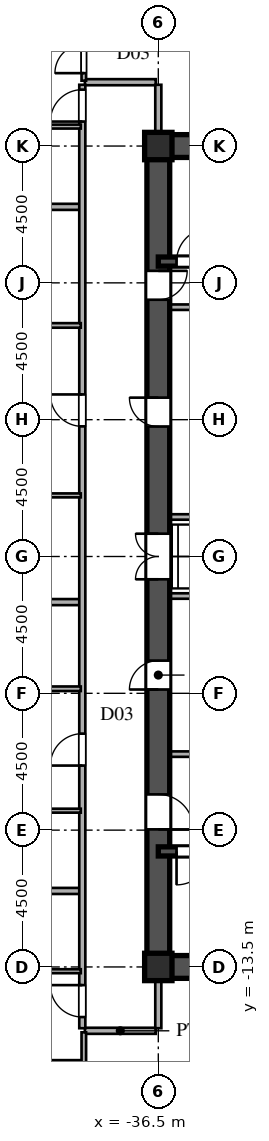
"""IFC4 building model, lengths in metres.
Left out: names, types, materials, properties, quantities, classifications, styles, units other than length and angle.
Written with IfcOpenShell. Run it as: python <this file> out.ifc"""

import sys

from ifc_helpers import new_model, si_unit, direction, frame, frame_2d, origin, origin_2d, place, context, subcontext, project, spatial, rectangle, i_section, extrude, source, transform, mapped, element, fill, save


model = new_model("IFC4")
c1 = context("Model", 3, precision=1e-05, world=origin(), true_north=direction((0.0, 1.0)))
c2 = subcontext(c1, "Body", "Model", "MODEL_VIEW")
j1 = project(units=[si_unit("LENGTHUNIT", "METRE"), si_unit("PLANEANGLEUNIT", "RADIAN")], contexts=[c1])
p1 = place(None, origin())
s1 = spatial("IfcSite", under=j1, at=p1, CompositionType="ELEMENT")
p2 = place(p1, origin())
s2 = spatial("IfcBuilding", under=s1, at=p2, CompositionType="ELEMENT")
p3 = place(p2, frame((0.0, 0.0, 40.5)))
s3 = spatial("IfcBuildingStorey", under=s2, at=p3, CompositionType="ELEMENT", Elevation=40.5)
m1 = source(origin(), c2, "Body", "SweptSolid", [
    extrude(i_section(OverallWidth=0.9, OverallDepth=0.9, WebThickness=0.036, FlangeThickness=0.055, at=origin_2d()), origin(), (0.0, 0.0, 1.0), 3.6),
])
for number, where, z_axis, x_axis in (
    (1, (-36.5, -13.5, 0.0), (0.0, 0.0, 1.0), (1.0, 0.0, 0.0)),
    (2, (-36.5, 13.5, 0.0), (0.0, 0.0, 1.0), (1.0, 0.0, 0.0)),
):
    element("IfcColumn", number, at=place(p3, frame(where, z_axis=z_axis, x_axis=x_axis)), inside=s3, PredefinedType="COLUMN", context=c2, shape_type="MappedRepresentation", body=[
        mapped(m1, transform((0.0, 0.0, 0.0), scale=1.0)),
    ])
for number, where, z_axis, x_axis in (
    (3, (-36.5, -13.5, 0.0), (0.0, 0.0, 1.0), (1.0, 0.0, 0.0)),
    (4, (-36.5, 13.5, 0.0), (0.0, 0.0, 1.0), (1.0, 0.0, 0.0)),
):
    element("IfcWall", number, at=place(p3, frame(where, z_axis=z_axis, x_axis=x_axis)), inside=s3, PredefinedType="SHEAR", context=c2, shape_type="SweptSolid", body=[
        extrude(rectangle(XDim=9.0, YDim=0.75, at=frame_2d((4.5, 0.0))), origin(), (0.0, 0.0, 1.0), 3.38),
    ])
p4 = place(p3, frame((-36.5, -13.65, 0.0), z_axis=(0.0, 0.0, 1.0), x_axis=(0.0, 1.0, 0.0)))
e5 = element("IfcWall", 5, at=p4, inside=s3, PredefinedType="SHEAR", context=c2, shape_type="SweptSolid", body=[
    extrude(rectangle(XDim=7.15, YDim=0.75, at=frame_2d((3.575, 0.0))), origin(), (0.0, 0.0, 1.0), 3.38),
])
p5 = place(p4, frame((4.675, 0.0, 0.0)))
e6 = element("IfcOpeningElement", 6, at=p5, cuts=e5, PredefinedType="OPENING", context=c2, shape_type="SweptSolid", body=[
    extrude(rectangle(XDim=1.15, YDim=2.2, at=frame_2d((0.575, 1.1))), frame((0.0, 0.385, 0.0), z_axis=(0.0, -1.0, 0.0), x_axis=(1.0, 0.0, 0.0)), (0.0, 0.0, 1.0), 0.77),
])
p6 = place(p3, frame((-36.5, -1.3, 0.0), z_axis=(0.0, 0.0, 1.0), x_axis=(0.0, 1.0, 0.0)))
e7 = element("IfcWall", 7, at=p6, inside=s3, PredefinedType="SHEAR", context=c2, shape_type="SweptSolid", body=[
    extrude(rectangle(XDim=2.6, YDim=0.75, at=frame_2d((1.3, 0.0))), origin(), (0.0, 0.0, 1.0), 3.38),
])
p7 = place(p6, frame((0.55, 0.0, 0.0)))
e8 = element("IfcOpeningElement", 8, at=p7, cuts=e7, PredefinedType="OPENING", context=c2, shape_type="SweptSolid", body=[
    extrude(rectangle(XDim=1.5, YDim=2.3, at=frame_2d((0.75, 1.15))), frame((0.0, 0.385, 0.0), z_axis=(0.0, -1.0, 0.0), x_axis=(1.0, 0.0, 0.0)), (0.0, 0.0, 1.0), 0.77),
])
p8 = place(p3, frame((-36.5, 8.2, 0.0), z_axis=(0.0, 0.0, 1.0), x_axis=(0.0, 1.0, 0.0)))
e9 = element("IfcWall", 9, at=p8, inside=s3, PredefinedType="SHEAR", context=c2, shape_type="SweptSolid", body=[
    extrude(rectangle(XDim=5.45, YDim=0.75, at=frame_2d((2.725, 0.0))), origin(), (0.0, 0.0, 1.0), 3.38),
])
p9 = place(p8, frame((0.245, 0.0, 0.0)))
e10 = element("IfcOpeningElement", 10, at=p9, cuts=e9, PredefinedType="OPENING", context=c2, shape_type="SweptSolid", body=[
    extrude(rectangle(XDim=0.95, YDim=2.15, at=frame_2d((0.475, 1.075))), frame((0.0, 0.385, 0.0), z_axis=(0.0, -1.0, 0.0), x_axis=(1.0, 0.0, 0.0)), (0.0, 0.0, 1.0), 0.77),
])
p10 = place(p3, frame((-36.5, -6.5, 0.0), z_axis=(0.0, 0.0, 1.0), x_axis=(0.0, 1.0, 0.0)))
e11 = element("IfcWall", 11, at=p10, inside=s3, PredefinedType="SHEAR", context=c2, shape_type="SweptSolid", body=[
    extrude(rectangle(XDim=5.2, YDim=0.75, at=frame_2d((2.6, 0.0))), origin(), (0.0, 0.0, 1.0), 3.38),
])
p11 = place(p10, frame((2.125, 0.0, 0.0)))
e12 = element("IfcOpeningElement", 12, at=p11, cuts=e11, PredefinedType="OPENING", context=c2, shape_type="SweptSolid", body=[
    extrude(rectangle(XDim=0.95, YDim=2.15, at=frame_2d((0.475, 1.075))), frame((0.0, 0.385, 0.0), z_axis=(0.0, -1.0, 0.0), x_axis=(1.0, 0.0, 0.0)), (0.0, 0.0, 1.0), 0.77),
])
p12 = place(p3, frame((-36.5, 1.3, 0.0), z_axis=(0.0, 0.0, 1.0), x_axis=(0.0, 1.0, 0.0)))
e13 = element("IfcWall", 13, at=p12, inside=s3, PredefinedType="SHEAR", context=c2, shape_type="SweptSolid", body=[
    extrude(rectangle(XDim=6.9, YDim=0.75, at=frame_2d((3.45, 0.0))), origin(), (0.0, 0.0, 1.0), 3.38),
])
p13 = place(p12, frame((2.975, 0.0, 0.0)))
e14 = element("IfcOpeningElement", 14, at=p13, cuts=e13, PredefinedType="OPENING", context=c2, shape_type="SweptSolid", body=[
    extrude(rectangle(XDim=0.95, YDim=2.15, at=frame_2d((0.475, 1.075))), frame((0.0, 0.385, 0.0), z_axis=(0.0, -1.0, 0.0), x_axis=(1.0, 0.0, 0.0)), (0.0, 0.0, 1.0), 0.77),
])
p14 = place(p3, frame((-36.5, -9.7, 0.0), z_axis=(0.0, 0.0, 1.0), x_axis=(1.0, 0.0, 0.0)))
e15 = element("IfcWall", 15, at=p14, inside=s3, PredefinedType="SHEAR", context=c2, shape_type="SweptSolid", body=[
    extrude(rectangle(XDim=9.0, YDim=0.3, at=frame_2d((4.5, 0.0))), origin(), (0.0, 0.0, 1.0), 3.38),
])
p15 = place(p14, frame((0.6, 0.0, 0.0)))
e16 = element("IfcOpeningElement", 16, at=p15, cuts=e15, PredefinedType="OPENING", context=c2, shape_type="SweptSolid", body=[
    extrude(rectangle(XDim=1.1, YDim=2.2, at=frame_2d((0.55, 1.1))), frame((0.0, 0.16, 0.0), z_axis=(0.0, -1.0, 0.0), x_axis=(1.0, 0.0, 0.0)), (0.0, 0.0, 1.0), 0.32),
])
p16 = place(p3, frame((-36.5, 9.7, 0.0), z_axis=(0.0, 0.0, 1.0), x_axis=(1.0, 0.0, 0.0)))
e17 = element("IfcWall", 17, at=p16, inside=s3, PredefinedType="SHEAR", context=c2, shape_type="SweptSolid", body=[
    extrude(rectangle(XDim=9.0, YDim=0.3, at=frame_2d((4.5, 0.0))), origin(), (0.0, 0.0, 1.0), 3.38),
])
p17 = place(p16, frame((0.6, 0.0, 0.0)))
e18 = element("IfcOpeningElement", 18, at=p17, cuts=e17, PredefinedType="OPENING", context=c2, shape_type="SweptSolid", body=[
    extrude(rectangle(XDim=1.1, YDim=2.2, at=frame_2d((0.55, 1.1))), frame((0.0, 0.16, 0.0), z_axis=(0.0, -1.0, 0.0), x_axis=(1.0, 0.0, 0.0)), (0.0, 0.0, 1.0), 0.32),
])
for number, where, z_axis, x_axis in (
    (19, (-36.15, -6.5, 0.0), (0.0, 0.0, 1.0), (1.0, 0.0, 0.0)),
    (20, (-36.15, 8.2, 0.0), (0.0, 0.0, 1.0), (1.0, 0.0, 0.0)),
):
    element("IfcWall", number, at=place(p3, frame(where, z_axis=z_axis, x_axis=x_axis)), inside=s3, PredefinedType="PARTITIONING", context=c2, shape_type="SweptSolid", body=[
        extrude(rectangle(XDim=5.7, YDim=0.18, at=frame_2d((2.85, 0.0))), origin(), (0.0, 0.0, 1.0), 3.38),
    ])
for number, where, z_axis, x_axis in (
    (21, (-36.15, -1.3, 0.0), (0.0, 0.0, 1.0), (1.0, 0.0, 0.0)),
    (22, (-36.15, 1.3, 0.0), (0.0, 0.0, 1.0), (1.0, 0.0, 0.0)),
):
    element("IfcWall", number, at=place(p3, frame(where, z_axis=z_axis, x_axis=x_axis)), inside=s3, PredefinedType="PARTITIONING", context=c2, shape_type="SweptSolid", body=[
        extrude(rectangle(XDim=2.95, YDim=0.18, at=frame_2d((1.475, 0.0))), origin(), (0.0, 0.0, 1.0), 3.38),
    ])
p18 = place(p3, frame((-44.55, -16.64, 0.0), z_axis=(0.0, 0.0, 1.0), x_axis=(1.0, 0.0, 0.0)))
e23 = element("IfcWall", 23, at=p18, inside=s3, PredefinedType="PARTITIONING", context=c2, shape_type="SweptSolid", body=[
    extrude(rectangle(XDim=5.55, YDim=0.15, at=frame_2d((2.775, 0.0))), origin(), (0.0, 0.0, 1.0), 3.38),
])
p19 = place(p18, frame((2.3, 0.0, 0.0)))
e24 = element("IfcOpeningElement", 24, at=p19, cuts=e23, PredefinedType="OPENING", context=c2, shape_type="SweptSolid", body=[
    extrude(rectangle(XDim=0.95, YDim=2.15, at=frame_2d((0.475, 1.075))), frame((0.0, 0.085, 0.0), z_axis=(0.0, -1.0, 0.0), x_axis=(1.0, 0.0, 0.0)), (0.0, 0.0, 1.0), 0.17),
])
p20 = place(p3, frame((-38.915, -15.6, 0.0), z_axis=(0.0, 0.0, 1.0), x_axis=(1.0, 0.0, 0.0)))
e25 = element("IfcWall", 25, at=p20, inside=s3, PredefinedType="PARTITIONING", context=c2, shape_type="SweptSolid", body=[
    extrude(rectangle(XDim=2.33, YDim=0.2, at=frame_2d((1.165, 0.0))), origin(), (0.0, 0.0, 1.0), 3.38),
])
p21 = place(p3, frame((-44.55, -13.64, 0.0), z_axis=(0.0, 0.0, 1.0), x_axis=(1.0, 0.0, 0.0)))
e26 = element("IfcWall", 26, at=p21, inside=s3, PredefinedType="PARTITIONING", context=c2, shape_type="SweptSolid", body=[
    extrude(rectangle(XDim=5.5, YDim=0.13, at=frame_2d((2.75, 0.0))), origin(), (0.0, 0.0, 1.0), 2.68),
])
p22 = place(p21, frame((2.31, 0.0, 0.0)))
e27 = element("IfcOpeningElement", 27, at=p22, cuts=e26, PredefinedType="OPENING", context=c2, shape_type="SweptSolid", body=[
    extrude(rectangle(XDim=0.88, YDim=2.1, at=frame_2d((0.44, 1.05))), frame((0.0, 0.075, 0.0), z_axis=(0.0, -1.0, 0.0), x_axis=(1.0, 0.0, 0.0)), (0.0, 0.0, 1.0), 0.15),
])
p23 = place(p3, frame((-70.043, -11.0, 0.0), z_axis=(0.0, 0.0, 1.0), x_axis=(1.0, 0.0, 0.0)))
e28 = element("IfcWall", 28, at=p23, inside=s3, PredefinedType="PARTITIONING", context=c2, shape_type="SweptSolid", body=[
    extrude(rectangle(XDim=30.963, YDim=0.2, at=frame_2d((15.481, 0.0))), origin(), (0.0, 0.0, 1.0), 3.38),
])
p24 = place(p3, frame((-44.55, -8.36, 0.0), z_axis=(0.0, 0.0, 1.0), x_axis=(1.0, 0.0, 0.0)))
e29 = element("IfcWall", 29, at=p24, inside=s3, PredefinedType="PARTITIONING", context=c2, shape_type="SweptSolid", body=[
    extrude(rectangle(XDim=5.5, YDim=0.13, at=frame_2d((2.75, 0.0))), origin(), (0.0, 0.0, 1.0), 3.38),
])
p25 = place(p24, frame((2.31, 0.0, 0.0)))
e30 = element("IfcOpeningElement", 30, at=p25, cuts=e29, PredefinedType="OPENING", context=c2, shape_type="SweptSolid", body=[
    extrude(rectangle(XDim=0.88, YDim=2.1, at=frame_2d((0.44, 1.05))), frame((0.0, 0.075, 0.0), z_axis=(0.0, -1.0, 0.0), x_axis=(1.0, 0.0, 0.0)), (0.0, 0.0, 1.0), 0.15),
])
p26 = place(p3, frame((-44.55, -4.35, 0.0), z_axis=(0.0, 0.0, 1.0), x_axis=(1.0, 0.0, 0.0)))
e31 = element("IfcWall", 31, at=p26, inside=s3, PredefinedType="PARTITIONING", context=c2, shape_type="SweptSolid", body=[
    extrude(rectangle(XDim=5.5, YDim=0.15, at=frame_2d((2.75, 0.0))), origin(), (0.0, 0.0, 1.0), 2.68),
])
p27 = place(p26, frame((2.275, 0.0, 0.0)))
e32 = element("IfcOpeningElement", 32, at=p27, cuts=e31, PredefinedType="OPENING", context=c2, shape_type="SweptSolid", body=[
    extrude(rectangle(XDim=0.95, YDim=2.15, at=frame_2d((0.475, 1.075))), frame((0.0, 0.085, 0.0), z_axis=(0.0, -1.0, 0.0), x_axis=(1.0, 0.0, 0.0)), (0.0, 0.0, 1.0), 0.17),
])
p28 = place(p3, frame((-72.505, -1.5, 0.0), z_axis=(0.0, 0.0, 1.0), x_axis=(1.0, 0.0, 0.0)))
e33 = element("IfcWall", 33, at=p28, inside=s3, PredefinedType="PARTITIONING", context=c2, shape_type="SweptSolid", body=[
    extrude(rectangle(XDim=33.425, YDim=0.2, at=frame_2d((16.712, 0.0))), origin(), (0.0, 0.0, 1.0), 3.38),
])
p29 = place(p3, frame((-44.55, 2.01, 0.0), z_axis=(0.0, 0.0, 1.0), x_axis=(1.0, 0.0, 0.0)))
e34 = element("IfcWall", 34, at=p29, inside=s3, PredefinedType="PARTITIONING", context=c2, shape_type="SweptSolid", body=[
    extrude(rectangle(XDim=5.5, YDim=0.13, at=frame_2d((2.75, 0.0))), origin(), (0.0, 0.0, 1.0), 3.38),
])
p30 = place(p29, frame((2.31, 0.0, 0.0)))
e35 = element("IfcOpeningElement", 35, at=p30, cuts=e34, PredefinedType="OPENING", context=c2, shape_type="SweptSolid", body=[
    extrude(rectangle(XDim=0.88, YDim=2.1, at=frame_2d((0.44, 1.05))), frame((0.0, 0.075, 0.0), z_axis=(0.0, -1.0, 0.0), x_axis=(1.0, 0.0, 0.0)), (0.0, 0.0, 1.0), 0.15),
])
p31 = place(p3, frame((-44.55, 7.6, 0.0), z_axis=(0.0, 0.0, 1.0), x_axis=(1.0, 0.0, 0.0)))
e36 = element("IfcWall", 36, at=p31, inside=s3, PredefinedType="PARTITIONING", context=c2, shape_type="SweptSolid", body=[
    extrude(rectangle(XDim=5.5, YDim=0.15, at=frame_2d((2.75, 0.0))), origin(), (0.0, 0.0, 1.0), 3.38),
])
p32 = place(p31, frame((2.275, 0.0, 0.0)))
e37 = element("IfcOpeningElement", 37, at=p32, cuts=e36, PredefinedType="OPENING", context=c2, shape_type="SweptSolid", body=[
    extrude(rectangle(XDim=0.95, YDim=2.15, at=frame_2d((0.475, 1.075))), frame((0.0, 0.085, 0.0), z_axis=(0.0, -1.0, 0.0), x_axis=(1.0, 0.0, 0.0)), (0.0, 0.0, 1.0), 0.17),
])
p33 = place(p3, frame((-68.807, 11.5, 0.0), z_axis=(0.0, 0.0, 1.0), x_axis=(1.0, 0.0, 0.0)))
e38 = element("IfcWall", 38, at=p33, inside=s3, PredefinedType="PARTITIONING", context=c2, shape_type="SweptSolid", body=[
    extrude(rectangle(XDim=29.727, YDim=0.2, at=frame_2d((14.863, 0.0))), origin(), (0.0, 0.0, 1.0), 3.38),
])
p34 = place(p3, frame((-44.55, 14.14, 0.0), z_axis=(0.0, 0.0, 1.0), x_axis=(1.0, 0.0, 0.0)))
e39 = element("IfcWall", 39, at=p34, inside=s3, PredefinedType="PARTITIONING", context=c2, shape_type="SweptSolid", body=[
    extrude(rectangle(XDim=5.5, YDim=0.13, at=frame_2d((2.75, 0.0))), origin(), (0.0, 0.0, 1.0), 3.38),
])
p35 = place(p34, frame((2.31, 0.0, 0.0)))
e40 = element("IfcOpeningElement", 40, at=p35, cuts=e39, PredefinedType="OPENING", context=c2, shape_type="SweptSolid", body=[
    extrude(rectangle(XDim=0.88, YDim=2.1, at=frame_2d((0.44, 1.05))), frame((0.0, 0.075, 0.0), z_axis=(0.0, -1.0, 0.0), x_axis=(1.0, 0.0, 0.0)), (0.0, 0.0, 1.0), 0.15),
])
p36 = place(p3, frame((-38.915, 15.6, 0.0), z_axis=(0.0, 0.0, 1.0), x_axis=(1.0, 0.0, 0.0)))
e41 = element("IfcWall", 41, at=p36, inside=s3, PredefinedType="PARTITIONING", context=c2, shape_type="SweptSolid", body=[
    extrude(rectangle(XDim=2.33, YDim=0.2, at=frame_2d((1.165, 0.0))), origin(), (0.0, 0.0, 1.0), 3.38),
])
p37 = place(p3, frame((-39.0, -15.515, 0.0), z_axis=(0.0, 0.0, 1.0), x_axis=(0.0, 1.0, 0.0)))
e42 = element("IfcWall", 42, at=p37, inside=s3, PredefinedType="PARTITIONING", context=c2, shape_type="SweptSolid", body=[
    extrude(rectangle(XDim=31.03, YDim=0.2, at=frame_2d((15.515, 0.0))), origin(), (0.0, 0.0, 1.0), 3.38),
])
p38 = place(p37, frame((0.367, 0.0, 0.0)))
e43 = element("IfcOpeningElement", 43, at=p38, cuts=e42, PredefinedType="OPENING", context=c2, shape_type="SweptSolid", body=[
    extrude(rectangle(XDim=1.05, YDim=2.25, at=frame_2d((0.525, 1.125))), frame((0.0, 0.11, 0.0), z_axis=(0.0, -1.0, 0.0), x_axis=(1.0, 0.0, 0.0)), (0.0, 0.0, 1.0), 0.22),
])
p39 = place(p37, frame((8.638, 0.0, 0.0)))
e44 = element("IfcOpeningElement", 44, at=p39, cuts=e42, PredefinedType="OPENING", context=c2, shape_type="SweptSolid", body=[
    extrude(rectangle(XDim=1.05, YDim=2.25, at=frame_2d((0.525, 1.125))), frame((0.0, 0.11, 0.0), z_axis=(0.0, -1.0, 0.0), x_axis=(1.0, 0.0, 0.0)), (0.0, 0.0, 1.0), 0.22),
])
p40 = place(p37, frame((19.795, 0.0, 0.0)))
e45 = element("IfcOpeningElement", 45, at=p40, cuts=e42, PredefinedType="OPENING", context=c2, shape_type="SweptSolid", body=[
    extrude(rectangle(XDim=1.05, YDim=2.25, at=frame_2d((0.525, 1.125))), frame((0.0, 0.11, 0.0), z_axis=(0.0, -1.0, 0.0), x_axis=(1.0, 0.0, 0.0)), (0.0, 0.0, 1.0), 0.22),
])
p41 = place(p37, frame((29.82, 0.0, 0.0)))
e46 = element("IfcOpeningElement", 46, at=p41, cuts=e42, PredefinedType="OPENING", context=c2, shape_type="SweptSolid", body=[
    extrude(rectangle(XDim=1.05, YDim=2.25, at=frame_2d((0.525, 1.125))), frame((0.0, 0.11, 0.0), z_axis=(0.0, -1.0, 0.0), x_axis=(1.0, 0.0, 0.0)), (0.0, 0.0, 1.0), 0.22),
])
p42 = place(p3, frame((-38.95, -23.615, 0.0), z_axis=(0.0, 0.0, 1.0), x_axis=(0.0, 1.0, 0.0)))
e47 = element("IfcWall", 47, at=p42, inside=s3, PredefinedType="PARTITIONING", context=c2, shape_type="SweptSolid", body=[
    extrude(rectangle(XDim=7.965, YDim=0.15, at=frame_2d((3.982, 0.0))), origin(), (0.0, 0.0, 1.0), 3.38),
])
p43 = place(p42, frame((1.225, 0.0, 0.0)))
e48 = element("IfcOpeningElement", 48, at=p43, cuts=e47, PredefinedType="OPENING", context=c2, shape_type="SweptSolid", body=[
    extrude(rectangle(XDim=0.95, YDim=2.15, at=frame_2d((0.475, 1.075))), frame((0.0, 0.085, 0.0), z_axis=(0.0, -1.0, 0.0), x_axis=(1.0, 0.0, 0.0)), (0.0, 0.0, 1.0), 0.17),
])
p44 = place(p3, frame((-38.95, 15.65, 0.0), z_axis=(0.0, 0.0, 1.0), x_axis=(0.0, 1.0, 0.0)))
e49 = element("IfcWall", 49, at=p44, inside=s3, PredefinedType="PARTITIONING", context=c2, shape_type="SweptSolid", body=[
    extrude(rectangle(XDim=7.965, YDim=0.15, at=frame_2d((3.982, 0.0))), origin(), (0.0, 0.0, 1.0), 3.38),
])
p45 = place(p44, frame((0.248, 0.0, 0.0)))
e50 = element("IfcOpeningElement", 50, at=p45, cuts=e49, PredefinedType="OPENING", context=c2, shape_type="SweptSolid", body=[
    extrude(rectangle(XDim=0.95, YDim=2.15, at=frame_2d((0.475, 1.075))), frame((0.0, 0.085, 0.0), z_axis=(0.0, -1.0, 0.0), x_axis=(1.0, 0.0, 0.0)), (0.0, 0.0, 1.0), 0.17),
])
for number, where, z_axis, x_axis in (
    (51, (-36.5, -15.515, 0.0), (0.0, 0.0, 1.0), (0.0, 1.0, 0.0)),
    (52, (-36.5, 13.88, 0.0), (0.0, 0.0, 1.0), (0.0, 1.0, 0.0)),
):
    element("IfcWall", number, at=place(p3, frame(where, z_axis=z_axis, x_axis=x_axis)), inside=s3, PredefinedType="PARTITIONING", context=c2, shape_type="SweptSolid", body=[
        extrude(rectangle(XDim=1.635, YDim=0.2, at=frame_2d((0.817, 0.0))), origin(), (0.0, 0.0, 1.0), 2.68),
    ])
m2 = source(origin(), c2, "Body", "SweptSolid", [
    extrude(rectangle(XDim=1.15, YDim=2.2, at=frame_2d((0.575, 1.1))), frame((0.0, 0.025, 0.0), z_axis=(0.0, -1.0, 0.0), x_axis=(1.0, 0.0, 0.0)), (0.0, 0.0, 1.0), 0.05),
])
p46 = place(p5, frame((1.15, 0.0, 0.0), z_axis=(0.0, 0.0, 1.0), x_axis=(-1.0, 0.0, 0.0)))
e53 = element("IfcDoor", 53, at=p46, inside=s3, OperationType="SINGLE_SWING_LEFT", PredefinedType="DOOR", context=c2, shape_type="MappedRepresentation", body=[
    mapped(m2, transform((0.0, 0.0, 0.0), scale=1.0)),
])
fill(e6, e53)
m3 = source(origin(), c2, "Body", "SweptSolid", [
    extrude(rectangle(XDim=1.5, YDim=2.3, at=frame_2d((0.75, 1.15))), frame((0.0, 0.025, 0.0), z_axis=(0.0, -1.0, 0.0), x_axis=(1.0, 0.0, 0.0)), (0.0, 0.0, 1.0), 0.05),
])
p47 = place(p7, origin())
e54 = element("IfcDoor", 54, at=p47, inside=s3, OperationType="DOUBLE_SWING_LEFT", PredefinedType="DOOR", context=c2, shape_type="MappedRepresentation", body=[
    mapped(m3, transform((0.0, 0.0, 0.0), scale=1.0)),
])
fill(e8, e54)
m4 = source(origin(), c2, "Body", "SweptSolid", [
    extrude(rectangle(XDim=0.95, YDim=2.15, at=frame_2d((0.475, 1.075))), frame((0.0, 0.025, 0.0), z_axis=(0.0, -1.0, 0.0), x_axis=(1.0, 0.0, 0.0)), (0.0, 0.0, 1.0), 0.05),
])
p48 = place(p9, frame((0.95, 0.0, 0.0), z_axis=(0.0, 0.0, 1.0), x_axis=(-1.0, 0.0, 0.0)))
e55 = element("IfcDoor", 55, at=p48, inside=s3, OperationType="SINGLE_SWING_RIGHT", PredefinedType="DOOR", context=c2, shape_type="MappedRepresentation", body=[
    mapped(m4, transform((0.0, 0.0, 0.0), scale=1.0)),
])
fill(e10, e55)
p49 = place(p11, origin())
e56 = element("IfcDoor", 56, at=p49, inside=s3, OperationType="SINGLE_SWING_LEFT", PredefinedType="DOOR", context=c2, shape_type="MappedRepresentation", body=[
    mapped(m4, transform((0.0, 0.0, 0.0), scale=1.0)),
])
fill(e12, e56)
p50 = place(p13, origin())
e57 = element("IfcDoor", 57, at=p50, inside=s3, OperationType="SINGLE_SWING_RIGHT", PredefinedType="DOOR", context=c2, shape_type="MappedRepresentation", body=[
    mapped(m4, transform((0.0, 0.0, 0.0), scale=1.0)),
])
fill(e14, e57)
m5 = source(origin(), c2, "Body", "SweptSolid", [
    extrude(rectangle(XDim=1.1, YDim=2.2, at=frame_2d((0.55, 1.1))), frame((0.0, 0.025, 0.0), z_axis=(0.0, -1.0, 0.0), x_axis=(1.0, 0.0, 0.0)), (0.0, 0.0, 1.0), 0.05),
])
p51 = place(p15, frame((1.1, 0.0, 0.0), z_axis=(0.0, 0.0, 1.0), x_axis=(-1.0, 0.0, 0.0)))
e58 = element("IfcDoor", 58, at=p51, inside=s3, OperationType="SINGLE_SWING_LEFT", PredefinedType="DOOR", context=c2, shape_type="MappedRepresentation", body=[
    mapped(m5, transform((0.0, 0.0, 0.0), scale=1.0)),
])
fill(e16, e58)
p52 = place(p17, origin())
e59 = element("IfcDoor", 59, at=p52, inside=s3, OperationType="SINGLE_SWING_RIGHT", PredefinedType="DOOR", context=c2, shape_type="MappedRepresentation", body=[
    mapped(m5, transform((0.0, 0.0, 0.0), scale=1.0)),
])
fill(e18, e59)
m6 = source(origin(), c2, "Body", "SweptSolid", [
    extrude(rectangle(XDim=1.05, YDim=2.25, at=frame_2d((0.525, 1.125))), frame((0.0, 0.025, 0.0), z_axis=(0.0, -1.0, 0.0), x_axis=(1.0, 0.0, 0.0)), (0.0, 0.0, 1.0), 0.05),
])
p53 = place(p38, origin())
e60 = element("IfcDoor", 60, at=p53, inside=s3, OperationType="SINGLE_SWING_RIGHT", PredefinedType="DOOR", context=c2, shape_type="MappedRepresentation", body=[
    mapped(m6, transform((0.0, 0.0, 0.0), scale=1.0)),
])
fill(e43, e60)
p54 = place(p39, origin())
e61 = element("IfcDoor", 61, at=p54, inside=s3, OperationType="SINGLE_SWING_LEFT", PredefinedType="DOOR", context=c2, shape_type="MappedRepresentation", body=[
    mapped(m6, transform((0.0, 0.0, 0.0), scale=1.0)),
])
fill(e44, e61)
p55 = place(p40, origin())
e62 = element("IfcDoor", 62, at=p55, inside=s3, OperationType="SINGLE_SWING_RIGHT", PredefinedType="DOOR", context=c2, shape_type="MappedRepresentation", body=[
    mapped(m6, transform((0.0, 0.0, 0.0), scale=1.0)),
])
fill(e45, e62)
p56 = place(p41, origin())
e63 = element("IfcDoor", 63, at=p56, inside=s3, OperationType="SINGLE_SWING_LEFT", PredefinedType="DOOR", context=c2, shape_type="MappedRepresentation", body=[
    mapped(m6, transform((0.0, 0.0, 0.0), scale=1.0)),
])
fill(e46, e63)
m7 = source(origin(), c2, "Body", "SweptSolid", [
    extrude(rectangle(XDim=0.95, YDim=2.15, at=frame_2d((0.475, 1.075))), frame((0.0, 0.025, 0.0), z_axis=(0.0, -1.0, 0.0), x_axis=(1.0, 0.0, 0.0)), (0.0, 0.0, 1.0), 0.05),
])
p57 = place(p45, origin())
e64 = element("IfcDoor", 64, at=p57, inside=s3, OperationType="SINGLE_SWING_LEFT", PredefinedType="DOOR", context=c2, shape_type="MappedRepresentation", body=[
    mapped(m7, transform((0.0, 0.0, 0.0), scale=1.0)),
])
fill(e50, e64)
save(model, sys.argv[1])
